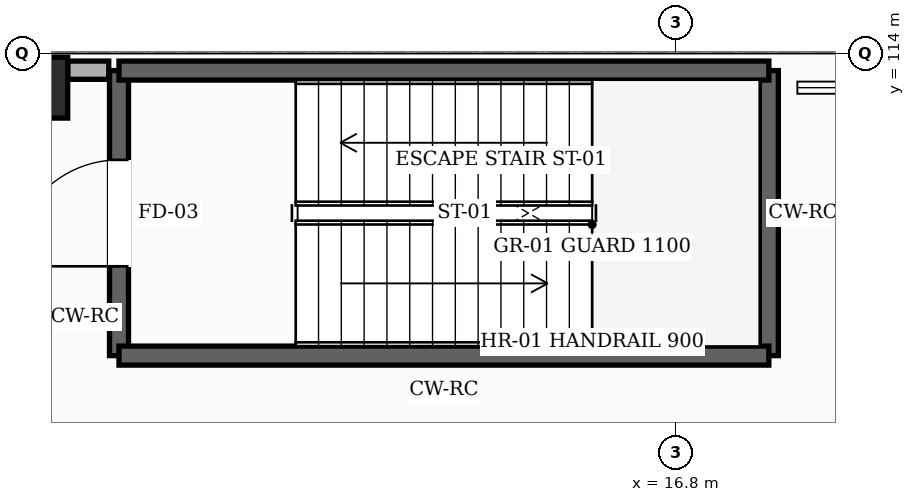
"""IFC4 building model, lengths in metres.
Left out: names, types, materials, properties, quantities, classifications, styles, units other than length and angle.
Written with IfcOpenShell. Run it as: python <this file> out.ifc"""

import sys

from ifc_helpers import new_model, si_unit, direction, frame, frame_2d, origin, origin_2d, place, context, subcontext, project, spatial, rectangle, hollow_rectangle, extrude, element, fill, save


model = new_model("IFC4")
c1 = context("Model", 3, precision=1e-05, world=origin(), true_north=direction((0.0, 1.0)))
c2 = subcontext(c1, "Body", "Model", "MODEL_VIEW")
j1 = project(units=[si_unit("LENGTHUNIT", "METRE"), si_unit("PLANEANGLEUNIT", "RADIAN")], contexts=[c1])
p1 = place(None, origin())
s1 = spatial("IfcSite", under=j1, at=p1, CompositionType="ELEMENT")
p2 = place(p1, origin())
s2 = spatial("IfcBuilding", under=s1, at=p2, CompositionType="ELEMENT")
p3 = place(p2, frame((0.0, 0.0, 10.2)))
s3 = spatial("IfcBuildingStorey", under=s2, at=p3, CompositionType="ELEMENT", Elevation=10.2)
p4 = place(p3, frame((8.4, 113.55, 0.0), z_axis=(0.0, 0.0, 1.0), x_axis=(1.0, 0.0, 0.0)))
e1 = element("IfcColumn", 1, at=p4, inside=s3, PredefinedType="COLUMN", context=c2, shape_type="SweptSolid", body=[
    extrude(hollow_rectangle(XDim=0.8, YDim=0.8, WallThickness=0.032, InnerFilletRadius=0.032, OuterFilletRadius=0.064, at=origin_2d()), origin(), (0.0, 0.0, 1.0), 4.8),
])
p5 = place(p3, frame((8.8, 113.78, 0.0), z_axis=(0.0, 0.0, 1.0), x_axis=(1.0, 0.0, 0.0)))
e2 = element("IfcWall", 2, at=p5, inside=s3, PredefinedType="SOLIDWALL", context=c2, shape_type="SweptSolid", body=[
    extrude(rectangle(XDim=0.54, YDim=0.24, at=frame_2d((0.27, 0.0))), origin(), (0.0, 0.0, 1.0), 4.545),
])
p6 = place(p3, frame((9.475, 110.025, 0.0), z_axis=(0.0, 0.0, 1.0), x_axis=(0.0, 1.0, 0.0)))
e3 = element("IfcWall", 3, at=p6, inside=s3, PredefinedType="SHEAR", context=c2, shape_type="SweptSolid", body=[
    extrude(rectangle(XDim=3.75, YDim=0.25, at=frame_2d((1.875, 0.0))), origin(), (0.0, 0.0, 1.0), 4.56),
])
p7 = place(p6, frame((1.175, 0.0, 0.0)))
e4 = element("IfcOpeningElement", 4, at=p7, cuts=e3, PredefinedType="OPENING", context=c2, shape_type="SweptSolid", body=[
    extrude(rectangle(XDim=1.4, YDim=2.25, at=frame_2d((0.7, 1.125))), frame((0.0, 0.135, 0.0), z_axis=(0.0, -1.0, 0.0), x_axis=(1.0, 0.0, 0.0)), (0.0, 0.0, 1.0), 0.27),
])
p8 = place(p3, frame((18.025, 113.775, 0.0), z_axis=(0.0, 0.0, 1.0), x_axis=(0.0, -1.0, 0.0)))
e5 = element("IfcWall", 5, at=p8, inside=s3, PredefinedType="SHEAR", context=c2, shape_type="SweptSolid", body=[
    extrude(rectangle(XDim=3.75, YDim=0.25, at=frame_2d((1.875, 0.0))), origin(), (0.0, 0.0, 1.0), 4.56),
])
for number, where, z_axis, x_axis in (
    (6, (18.025, 110.025, 0.0), (0.0, 0.0, 1.0), (-1.0, 0.0, 0.0)),
    (7, (9.475, 113.775, 0.0), (0.0, 0.0, 1.0), (1.0, 0.0, 0.0)),
):
    element("IfcWall", number, at=place(p3, frame(where, z_axis=z_axis, x_axis=x_axis)), inside=s3, PredefinedType="SHEAR", context=c2, shape_type="SweptSolid", body=[
        extrude(rectangle(XDim=8.55, YDim=0.25, at=frame_2d((4.275, 0.0))), origin(), (0.0, 0.0, 1.0), 4.56),
    ])
p9 = place(p7, origin())
e8 = element("IfcDoor", 8, at=p9, inside=s3, OperationType="SINGLE_SWING_LEFT", PredefinedType="DOOR", context=c2, shape_type="SweptSolid", body=[
    extrude(rectangle(XDim=1.4, YDim=2.25, at=frame_2d((0.7, 1.125))), frame((0.0, 0.025, 0.0), z_axis=(0.0, -1.0, 0.0), x_axis=(1.0, 0.0, 0.0)), (0.0, 0.0, 1.0), 0.05),
])
fill(e4, e8)
save(model, sys.argv[1])
